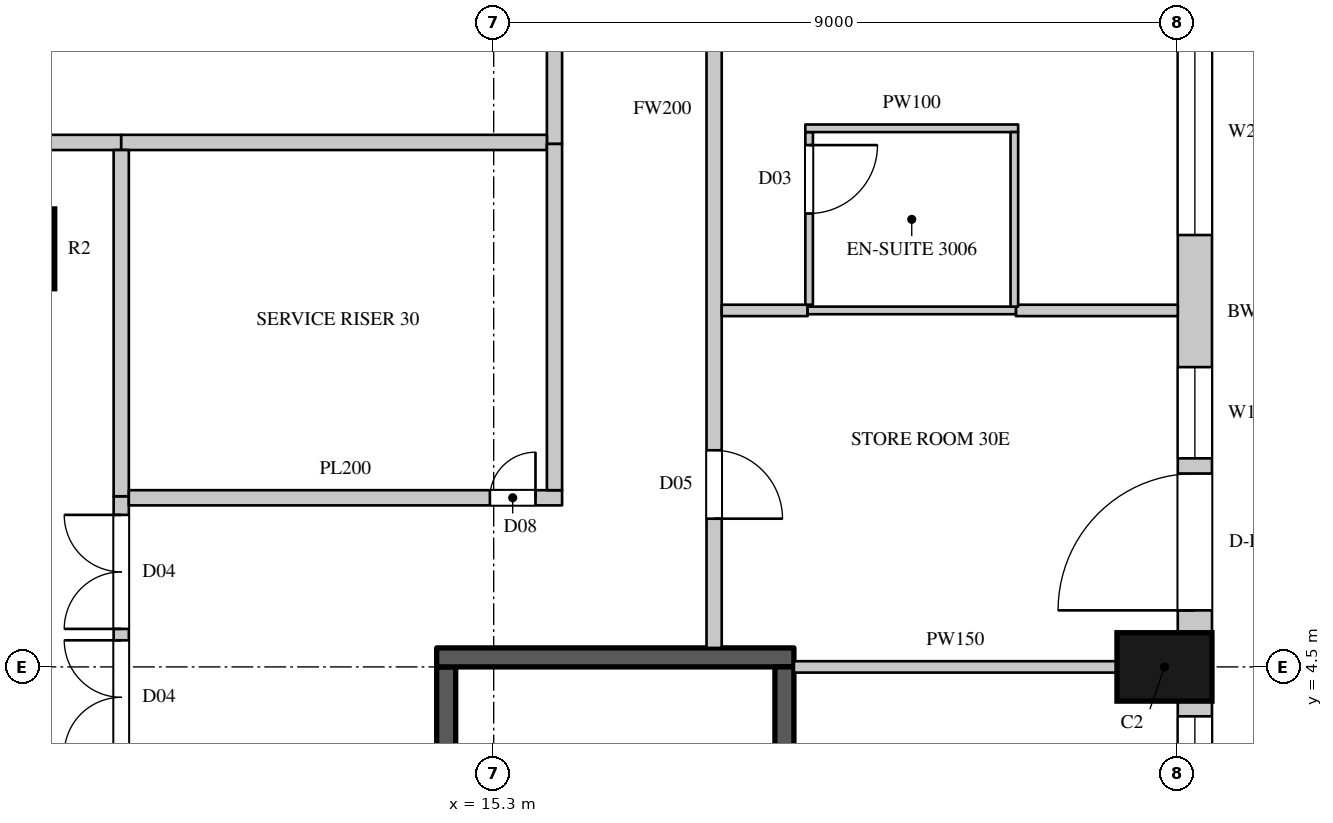
"""IFC4 building model, lengths in metres.
Left out: names, types, materials, properties, quantities, classifications, styles, units other than length and angle.
Written with IfcOpenShell. Run it as: python <this file> out.ifc"""

import sys

from ifc_helpers import new_model, si_unit, direction, frame, frame_2d, origin, origin_2d, place, context, subcontext, project, spatial, rectangle, circle, extrude, element, fill, save


model = new_model("IFC4")
c1 = context("Model", 3, precision=1e-05, world=origin(), true_north=direction((0.0, 1.0)))
c2 = subcontext(c1, "Body", "Model", "MODEL_VIEW")
j1 = project(units=[si_unit("LENGTHUNIT", "METRE"), si_unit("PLANEANGLEUNIT", "RADIAN")], contexts=[c1])
p1 = place(None, origin())
s1 = spatial("IfcSite", under=j1, at=p1, CompositionType="ELEMENT")
p2 = place(p1, origin())
s2 = spatial("IfcBuilding", under=s1, at=p2, CompositionType="ELEMENT")
p3 = place(p2, frame((0.0, 0.0, 138.3)))
s3 = spatial("IfcBuildingStorey", under=s2, at=p3, CompositionType="ELEMENT", Elevation=138.3)
p4 = place(p3, frame((24.125, 4.5, 0.0), z_axis=(0.0, 0.0, 1.0), x_axis=(0.0, 1.0, 0.0)))
e1 = element("IfcColumn", 1, at=p4, inside=s3, PredefinedType="COLUMN", context=c2, shape_type="SweptSolid", body=[
    extrude(rectangle(XDim=0.9, YDim=1.25, at=origin_2d()), origin(), (0.0, 0.0, 1.0), 3.6),
])
p5 = place(p3, frame((9.0, 10.0, 0.0), z_axis=(0.0, 0.0, 1.0), x_axis=(1.0, 0.0, 0.0)))
e2 = element("IfcColumn", 2, at=p5, inside=s3, PredefinedType="COLUMN", context=c2, shape_type="SweptSolid", body=[
    extrude(circle(Radius=0.525, at=origin_2d()), origin(), (0.0, 0.0, 1.0), 3.6),
])
p6 = place(p3, frame((24.525, -4.05, 0.0), z_axis=(0.0, 0.0, 1.0), x_axis=(0.0, 1.0, 0.0)))
e3 = element("IfcWall", 3, at=p6, inside=s3, PredefinedType="SOLIDWALL", context=c2, shape_type="SweptSolid", body=[
    extrude(rectangle(XDim=8.1, YDim=0.45, at=frame_2d((4.05, 0.0))), origin(), (0.0, 0.0, 1.0), 3.3),
])
p7 = place(p6, frame((0.2, 0.0, 0.0)))
e4 = element("IfcOpeningElement", 4, at=p7, cuts=e3, PredefinedType="OPENING", context=c2, shape_type="SweptSolid", body=[
    extrude(rectangle(XDim=1.8, YDim=2.4, at=frame_2d((0.9, 1.2))), frame((0.0, 0.235, 0.0), z_axis=(0.0, -1.0, 0.0), x_axis=(1.0, 0.0, 0.0)), (0.0, 0.0, 1.0), 0.47),
])
p8 = place(p6, frame((2.2, 0.0, 1.05)))
e5 = element("IfcOpeningElement", 5, at=p8, cuts=e3, PredefinedType="OPENING", context=c2, shape_type="SweptSolid", body=[
    extrude(rectangle(XDim=1.2, YDim=2.0, at=frame_2d((0.6, 1.0))), frame((0.0, 0.235, 0.0), z_axis=(0.0, -1.0, 0.0), x_axis=(1.0, 0.0, 0.0)), (0.0, 0.0, 1.0), 0.47),
])
p9 = place(p6, frame((4.7, 0.0, 0.0)))
e6 = element("IfcOpeningElement", 6, at=p9, cuts=e3, PredefinedType="OPENING", context=c2, shape_type="SweptSolid", body=[
    extrude(rectangle(XDim=1.8, YDim=2.4, at=frame_2d((0.9, 1.2))), frame((0.0, 0.235, 0.0), z_axis=(0.0, -1.0, 0.0), x_axis=(1.0, 0.0, 0.0)), (0.0, 0.0, 1.0), 0.47),
])
p10 = place(p6, frame((6.7, 0.0, 1.05)))
e7 = element("IfcOpeningElement", 7, at=p10, cuts=e3, PredefinedType="OPENING", context=c2, shape_type="SweptSolid", body=[
    extrude(rectangle(XDim=1.2, YDim=2.0, at=frame_2d((0.6, 1.0))), frame((0.0, 0.235, 0.0), z_axis=(0.0, -1.0, 0.0), x_axis=(1.0, 0.0, 0.0)), (0.0, 0.0, 1.0), 0.47),
])
p11 = place(p3, frame((24.525, 4.95, 0.0), z_axis=(0.0, 0.0, 1.0), x_axis=(0.0, 1.0, 0.0)))
e8 = element("IfcWall", 8, at=p11, inside=s3, PredefinedType="SOLIDWALL", context=c2, shape_type="SweptSolid", body=[
    extrude(rectangle(XDim=8.439, YDim=0.45, at=frame_2d((4.219, 0.0))), origin(), (0.0, 0.0, 1.0), 3.3),
])
p12 = place(p11, frame((0.294, 0.0, 0.0)))
e9 = element("IfcOpeningElement", 9, at=p12, cuts=e8, PredefinedType="OPENING", context=c2, shape_type="SweptSolid", body=[
    extrude(rectangle(XDim=1.8, YDim=2.4, at=frame_2d((0.9, 1.2))), frame((0.0, 0.235, 0.0), z_axis=(0.0, -1.0, 0.0), x_axis=(1.0, 0.0, 0.0)), (0.0, 0.0, 1.0), 0.47),
])
p13 = place(p11, frame((2.294, 0.0, 1.05)))
e10 = element("IfcOpeningElement", 10, at=p13, cuts=e8, PredefinedType="OPENING", context=c2, shape_type="SweptSolid", body=[
    extrude(rectangle(XDim=1.2, YDim=2.0, at=frame_2d((0.6, 1.0))), frame((0.0, 0.235, 0.0), z_axis=(0.0, -1.0, 0.0), x_axis=(1.0, 0.0, 0.0)), (0.0, 0.0, 1.0), 0.47),
])
p14 = place(p11, frame((5.232, 0.0, 1.05)))
e11 = element("IfcOpeningElement", 11, at=p14, cuts=e8, PredefinedType="OPENING", context=c2, shape_type="SweptSolid", body=[
    extrude(rectangle(XDim=2.7, YDim=2.0, at=frame_2d((1.35, 1.0))), frame((0.0, 0.235, 0.0), z_axis=(0.0, -1.0, 0.0), x_axis=(1.0, 0.0, 0.0)), (0.0, 0.0, 1.0), 0.47),
])
p15 = place(p3, frame((-8.3, 11.4, 0.0), z_axis=(0.0, 0.0, 1.0), x_axis=(1.0, 0.0, 0.0)))
e12 = element("IfcWall", 12, at=p15, inside=s3, PredefinedType="PARTITIONING", context=c2, shape_type="SweptSolid", body=[
    extrude(rectangle(XDim=18.7, YDim=0.2, at=frame_2d((9.35, 0.0))), origin(), (0.0, 0.0, 1.0), 3.3),
])
p16 = place(p15, frame((6.9, 0.0, 0.0)))
e13 = element("IfcOpeningElement", 13, at=p16, cuts=e12, PredefinedType="OPENING", context=c2, shape_type="SweptSolid", body=[
    extrude(rectangle(XDim=1.5, YDim=2.2, at=frame_2d((0.75, 1.1))), frame((0.0, 0.11, 0.0), z_axis=(0.0, -1.0, 0.0), x_axis=(1.0, 0.0, 0.0)), (0.0, 0.0, 1.0), 0.22),
])
p17 = place(p3, frame((10.4, -11.3, 0.0), z_axis=(0.0, 0.0, 1.0), x_axis=(0.0, 1.0, 0.0)))
e14 = element("IfcWall", 14, at=p17, inside=s3, PredefinedType="PARTITIONING", context=c2, shape_type="SweptSolid", body=[
    extrude(rectangle(XDim=18.045, YDim=0.2, at=frame_2d((9.022, 0.0))), origin(), (0.0, 0.0, 1.0), 3.3),
])
p18 = place(p17, frame((16.3, 0.0, 0.0)))
e15 = element("IfcOpeningElement", 15, at=p18, cuts=e14, PredefinedType="OPENING", context=c2, shape_type="SweptSolid", body=[
    extrude(rectangle(XDim=1.5, YDim=2.2, at=frame_2d((0.75, 1.1))), frame((0.0, 0.11, 0.0), z_axis=(0.0, -1.0, 0.0), x_axis=(1.0, 0.0, 0.0)), (0.0, 0.0, 1.0), 0.22),
])
p19 = place(p17, frame((14.65, 0.0, 0.0)))
e16 = element("IfcOpeningElement", 16, at=p19, cuts=e14, PredefinedType="OPENING", context=c2, shape_type="SweptSolid", body=[
    extrude(rectangle(XDim=1.5, YDim=2.2, at=frame_2d((0.75, 1.1))), frame((0.0, 0.11, 0.0), z_axis=(0.0, -1.0, 0.0), x_axis=(1.0, 0.0, 0.0)), (0.0, 0.0, 1.0), 0.22),
])
p20 = place(p17, frame((9.1, 0.0, 0.0)))
e17 = element("IfcOpeningElement", 17, at=p20, cuts=e14, PredefinedType="OPENING", context=c2, shape_type="SweptSolid", body=[
    extrude(rectangle(XDim=1.5, YDim=2.2, at=frame_2d((0.75, 1.1))), frame((0.0, 0.11, 0.0), z_axis=(0.0, -1.0, 0.0), x_axis=(1.0, 0.0, 0.0)), (0.0, 0.0, 1.0), 0.22),
])
p21 = place(p3, frame((16.1, 11.38, 0.0), z_axis=(0.0, 0.0, 1.0), x_axis=(0.0, 1.0, 0.0)))
e18 = element("IfcWall", 18, at=p21, inside=s3, PredefinedType="PARTITIONING", context=c2, shape_type="SweptSolid", body=[
    extrude(rectangle(XDim=6.02, YDim=0.2, at=frame_2d((3.01, 0.0))), origin(), (0.0, 0.0, 1.0), 3.3),
])
p22 = place(p3, frame((18.2, 4.75, 0.0), z_axis=(0.0, 0.0, 1.0), x_axis=(0.0, 1.0, 0.0)))
e19 = element("IfcWall", 19, at=p22, inside=s3, PredefinedType="PARTITIONING", context=c2, shape_type="SweptSolid", body=[
    extrude(rectangle(XDim=14.164, YDim=0.2, at=frame_2d((7.082, 0.0))), origin(), (0.0, 0.0, 1.0), 3.3),
])
p23 = place(p22, frame((1.7, 0.0, 0.0)))
e20 = element("IfcOpeningElement", 20, at=p23, cuts=e19, PredefinedType="OPENING", context=c2, shape_type="SweptSolid", body=[
    extrude(rectangle(XDim=0.9, YDim=2.2, at=frame_2d((0.45, 1.1))), frame((0.0, 0.11, 0.0), z_axis=(0.0, -1.0, 0.0), x_axis=(1.0, 0.0, 0.0)), (0.0, 0.0, 1.0), 0.22),
])
p24 = place(p3, frame((18.3, 9.19, 0.0), z_axis=(0.0, 0.0, 1.0), x_axis=(1.0, 0.0, 0.0)))
e21 = element("IfcWall", 21, at=p24, inside=s3, PredefinedType="PARTITIONING", context=c2, shape_type="SweptSolid", body=[
    extrude(rectangle(XDim=1.13, YDim=0.15, at=frame_2d((0.565, 0.0))), origin(), (0.0, 0.0, 1.0), 2.65),
])
p25 = place(p3, frame((19.25, 4.5, 0.0), z_axis=(0.0, 0.0, 1.0), x_axis=(1.0, 0.0, 0.0)))
e22 = element("IfcWall", 22, at=p25, inside=s3, PredefinedType="PARTITIONING", context=c2, shape_type="SweptSolid", body=[
    extrude(rectangle(XDim=4.25, YDim=0.15, at=frame_2d((2.125, 0.0))), origin(), (0.0, 0.0, 1.0), 3.3),
])
p26 = place(p3, frame((22.17, 9.19, 0.0), z_axis=(0.0, 0.0, 1.0), x_axis=(1.0, 0.0, 0.0)))
e23 = element("IfcWall", 23, at=p26, inside=s3, PredefinedType="PARTITIONING", context=c2, shape_type="SweptSolid", body=[
    extrude(rectangle(XDim=2.13, YDim=0.15, at=frame_2d((1.065, 0.0))), origin(), (0.0, 0.0, 1.0), 2.65),
])
p27 = place(p3, frame((10.4, 11.4, 0.0), z_axis=(0.0, 0.0, 1.0), x_axis=(1.0, 0.0, 0.0)))
e24 = element("IfcWall", 24, at=p27, inside=s3, PredefinedType="PARTITIONING", context=c2, shape_type="SweptSolid", body=[
    extrude(rectangle(XDim=5.6, YDim=0.2, at=frame_2d((2.8, 0.0))), origin(), (0.0, 0.0, 1.0), 3.3),
])
p28 = place(p3, frame((10.4, 6.745, 0.0), z_axis=(0.0, 0.0, 1.0), x_axis=(0.0, 1.0, 0.0)))
e25 = element("IfcWall", 25, at=p28, inside=s3, PredefinedType="PARTITIONING", context=c2, shape_type="SweptSolid", body=[
    extrude(rectangle(XDim=4.555, YDim=0.2, at=frame_2d((2.277, 0.0))), origin(), (0.0, 0.0, 1.0), 3.3),
])
p29 = place(p3, frame((10.5, 6.725, 0.0), z_axis=(0.0, 0.0, 1.0), x_axis=(1.0, 0.0, 0.0)))
e26 = element("IfcWall", 26, at=p29, inside=s3, PredefinedType="PARTITIONING", context=c2, shape_type="SweptSolid", body=[
    extrude(rectangle(XDim=5.7, YDim=0.2, at=frame_2d((2.85, 0.0))), origin(), (0.0, 0.0, 1.0), 3.3),
])
p30 = place(p29, frame((4.75, 0.0, 0.0)))
e27 = element("IfcOpeningElement", 27, at=p30, cuts=e26, PredefinedType="OPENING", context=c2, shape_type="SweptSolid", body=[
    extrude(rectangle(XDim=0.6, YDim=2.0, at=frame_2d((0.3, 1.0))), frame((0.0, 0.11, 0.0), z_axis=(0.0, -1.0, 0.0), x_axis=(1.0, 0.0, 0.0)), (0.0, 0.0, 1.0), 0.22),
])
p31 = place(p3, frame((16.1, 6.825, 0.0), z_axis=(0.0, 0.0, 1.0), x_axis=(0.0, 1.0, 0.0)))
e28 = element("IfcWall", 28, at=p31, inside=s3, PredefinedType="PARTITIONING", context=c2, shape_type="SweptSolid", body=[
    extrude(rectangle(XDim=4.555, YDim=0.2, at=frame_2d((2.277, 0.0))), origin(), (0.0, 0.0, 1.0), 3.3),
])
p32 = place(p3, frame((14.675, -4.5, 0.0), z_axis=(0.0, 0.0, 1.0), x_axis=(0.0, 1.0, 0.0)))
e29 = element("IfcWall", 29, at=p32, inside=s3, PredefinedType="SHEAR", context=c2, shape_type="SweptSolid", body=[
    extrude(rectangle(XDim=9.0, YDim=0.25, at=frame_2d((4.5, 0.0))), origin(), (0.0, 0.0, 1.0), 3.3),
])
p33 = place(p32, frame((0.45, 0.0, 0.0)))
e30 = element("IfcOpeningElement", 30, at=p33, cuts=e29, PredefinedType="OPENING", context=c2, shape_type="SweptSolid", body=[
    extrude(rectangle(XDim=1.1, YDim=2.2, at=frame_2d((0.55, 1.1))), frame((0.0, 0.135, 0.0), z_axis=(0.0, -1.0, 0.0), x_axis=(1.0, 0.0, 0.0)), (0.0, 0.0, 1.0), 0.27),
])
p34 = place(p3, frame((14.55, 4.625, 0.0), z_axis=(0.0, 0.0, 1.0), x_axis=(1.0, 0.0, 0.0)))
e31 = element("IfcWall", 31, at=p34, inside=s3, PredefinedType="SHEAR", context=c2, shape_type="SweptSolid", body=[
    extrude(rectangle(XDim=4.7, YDim=0.25, at=frame_2d((2.35, 0.0))), origin(), (0.0, 0.0, 1.0), 3.3),
])
p35 = place(p3, frame((19.125, -4.5, 0.0), z_axis=(0.0, 0.0, 1.0), x_axis=(0.0, 1.0, 0.0)))
e32 = element("IfcWall", 32, at=p35, inside=s3, PredefinedType="SHEAR", context=c2, shape_type="SweptSolid", body=[
    extrude(rectangle(XDim=9.0, YDim=0.25, at=frame_2d((4.5, 0.0))), origin(), (0.0, 0.0, 1.0), 3.3),
])
p36 = place(p3, frame((19.43, 9.19, 0.0), z_axis=(0.0, 0.0, 1.0), x_axis=(1.0, 0.0, 0.0)))
e33 = element("IfcWall", 33, at=p36, inside=s3, PredefinedType="PARTITIONING", context=c2, shape_type="SweptSolid", body=[
    extrude(rectangle(XDim=2.74, YDim=0.1, at=frame_2d((1.37, 0.0))), origin(), (0.0, 0.0, 1.0), 2.65),
])
p37 = place(p3, frame((19.45, 9.265, 0.0), z_axis=(0.0, 0.0, 1.0), x_axis=(0.0, 1.0, 0.0)))
e34 = element("IfcWall", 34, at=p37, inside=s3, PredefinedType="PARTITIONING", context=c2, shape_type="SweptSolid", body=[
    extrude(rectangle(XDim=2.271, YDim=0.1, at=frame_2d((1.135, 0.0))), origin(), (0.0, 0.0, 1.0), 3.3),
])
p38 = place(p37, frame((1.2, 0.0, 0.0)))
e35 = element("IfcOpeningElement", 35, at=p38, cuts=e34, PredefinedType="OPENING", context=c2, shape_type="SweptSolid", body=[
    extrude(rectangle(XDim=0.9, YDim=2.2, at=frame_2d((0.45, 1.1))), frame((0.0, 0.06, 0.0), z_axis=(0.0, -1.0, 0.0), x_axis=(1.0, 0.0, 0.0)), (0.0, 0.0, 1.0), 0.12),
])
p39 = place(p3, frame((19.4, 11.586, 0.0), z_axis=(0.0, 0.0, 1.0), x_axis=(1.0, 0.0, 0.0)))
e36 = element("IfcWall", 36, at=p39, inside=s3, PredefinedType="PARTITIONING", context=c2, shape_type="SweptSolid", body=[
    extrude(rectangle(XDim=2.8, YDim=0.1, at=frame_2d((1.4, 0.0))), origin(), (0.0, 0.0, 1.0), 3.3),
])
p40 = place(p3, frame((22.15, 9.24, 0.0), z_axis=(0.0, 0.0, 1.0), x_axis=(0.0, 1.0, 0.0)))
e37 = element("IfcWall", 37, at=p40, inside=s3, PredefinedType="PARTITIONING", context=c2, shape_type="SweptSolid", body=[
    extrude(rectangle(XDim=2.296, YDim=0.1, at=frame_2d((1.148, 0.0))), origin(), (0.0, 0.0, 1.0), 3.3),
])
p41 = place(p10, origin())
e38 = element("IfcWindow", 38, at=p41, inside=s3, PartitioningType="SINGLE_PANEL", PredefinedType="WINDOW", context=c2, shape_type="SweptSolid", body=[
    extrude(rectangle(XDim=1.2, YDim=2.0, at=frame_2d((0.6, 1.0))), frame((0.0, 0.135, 0.0), z_axis=(0.0, -1.0, 0.0), x_axis=(1.0, 0.0, 0.0)), (0.0, 0.0, 1.0), 0.06),
])
fill(e7, e38)
p42 = place(p12, origin())
e39 = element("IfcDoor", 39, at=p42, inside=s3, OperationType="SLIDING_TO_LEFT", PredefinedType="DOOR", context=c2, shape_type="SweptSolid", body=[
    extrude(rectangle(XDim=1.8, YDim=2.4, at=frame_2d((0.9, 1.2))), frame((0.0, 0.13, 0.0), z_axis=(0.0, -1.0, 0.0), x_axis=(1.0, 0.0, 0.0)), (0.0, 0.0, 1.0), 0.05),
])
fill(e9, e39)
p43 = place(p13, origin())
e40 = element("IfcWindow", 40, at=p43, inside=s3, PartitioningType="SINGLE_PANEL", PredefinedType="WINDOW", context=c2, shape_type="SweptSolid", body=[
    extrude(rectangle(XDim=1.2, YDim=2.0, at=frame_2d((0.6, 1.0))), frame((0.0, 0.135, 0.0), z_axis=(0.0, -1.0, 0.0), x_axis=(1.0, 0.0, 0.0)), (0.0, 0.0, 1.0), 0.06),
])
fill(e10, e40)
p44 = place(p14, origin())
e41 = element("IfcWindow", 41, at=p44, inside=s3, PartitioningType="SINGLE_PANEL", PredefinedType="WINDOW", context=c2, shape_type="SweptSolid", body=[
    extrude(rectangle(XDim=2.7, YDim=2.0, at=frame_2d((1.35, 1.0))), frame((0.0, 0.135, 0.0), z_axis=(0.0, -1.0, 0.0), x_axis=(1.0, 0.0, 0.0)), (0.0, 0.0, 1.0), 0.06),
])
fill(e11, e41)
p45 = place(p18, origin())
e42 = element("IfcDoor", 42, at=p45, inside=s3, OperationType="DOUBLE_DOOR_SINGLE_SWING", PredefinedType="DOOR", context=c2, shape_type="SweptSolid", body=[
    extrude(rectangle(XDim=1.5, YDim=2.2, at=frame_2d((0.75, 1.1))), frame((0.0, 0.025, 0.0), z_axis=(0.0, -1.0, 0.0), x_axis=(1.0, 0.0, 0.0)), (0.0, 0.0, 1.0), 0.05),
])
fill(e15, e42)
p46 = place(p19, origin())
e43 = element("IfcDoor", 43, at=p46, inside=s3, OperationType="DOUBLE_DOOR_SINGLE_SWING", PredefinedType="DOOR", context=c2, shape_type="SweptSolid", body=[
    extrude(rectangle(XDim=1.5, YDim=2.2, at=frame_2d((0.75, 1.1))), frame((0.0, 0.025, 0.0), z_axis=(0.0, -1.0, 0.0), x_axis=(1.0, 0.0, 0.0)), (0.0, 0.0, 1.0), 0.05),
])
fill(e16, e43)
p47 = place(p30, origin())
e44 = element("IfcDoor", 44, at=p47, inside=s3, OperationType="SINGLE_SWING_RIGHT", PredefinedType="DOOR", context=c2, shape_type="SweptSolid", body=[
    extrude(rectangle(XDim=0.6, YDim=2.0, at=frame_2d((0.3, 1.0))), frame((0.0, 0.025, 0.0), z_axis=(0.0, -1.0, 0.0), x_axis=(1.0, 0.0, 0.0)), (0.0, 0.0, 1.0), 0.05),
])
fill(e27, e44)
p48 = place(p23, origin())
e45 = element("IfcDoor", 45, at=p48, inside=s3, OperationType="SINGLE_SWING_RIGHT", PredefinedType="DOOR", context=c2, shape_type="SweptSolid", body=[
    extrude(rectangle(XDim=0.9, YDim=2.2, at=frame_2d((0.45, 1.1))), frame((0.0, 0.025, 0.0), z_axis=(0.0, -1.0, 0.0), x_axis=(1.0, 0.0, 0.0)), (0.0, 0.0, 1.0), 0.05),
])
fill(e20, e45)
p49 = place(p38, origin())
e46 = element("IfcDoor", 46, at=p49, inside=s3, OperationType="SINGLE_SWING_LEFT", PredefinedType="DOOR", context=c2, shape_type="SweptSolid", body=[
    extrude(rectangle(XDim=0.9, YDim=2.2, at=frame_2d((0.45, 1.1))), frame((0.0, 0.025, 0.0), z_axis=(0.0, -1.0, 0.0), x_axis=(1.0, 0.0, 0.0)), (0.0, 0.0, 1.0), 0.05),
])
fill(e35, e46)
save(model, sys.argv[1])
